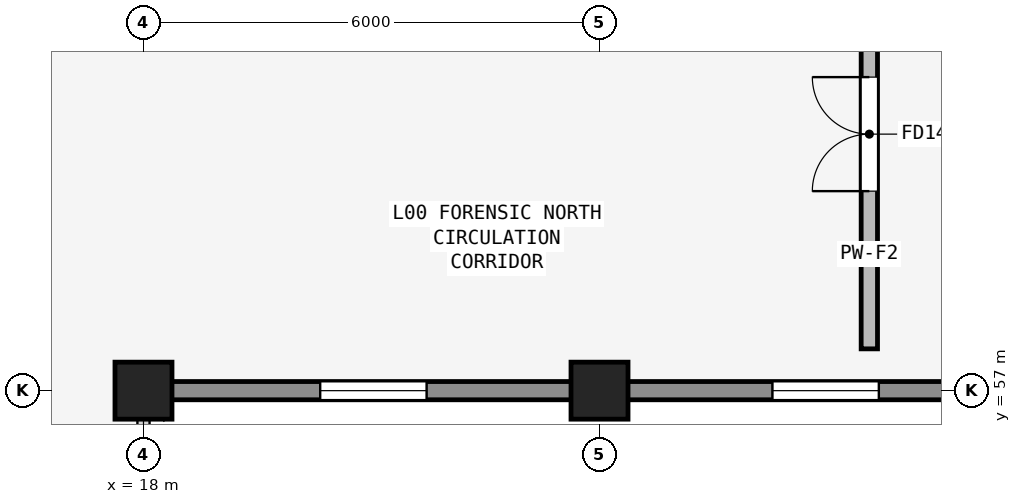
"""IFC4 building model, lengths in metres.
Left out: names, types, materials, properties, quantities, classifications, styles, units other than length and angle.
Written with IfcOpenShell. Run it as: python <this file> out.ifc"""

import sys

from ifc_helpers import new_model, si_unit, direction, frame, frame_2d, origin, origin_2d, place, context, subcontext, project, spatial, rectangle, extrude, element, fill, save


model = new_model("IFC4")
c1 = context("Model", 3, precision=1e-05, world=origin(), true_north=direction((0.0, 1.0)))
c2 = subcontext(c1, "Body", "Model", "MODEL_VIEW")
j1 = project(units=[si_unit("LENGTHUNIT", "METRE"), si_unit("PLANEANGLEUNIT", "RADIAN")], contexts=[c1])
p1 = place(None, origin())
s1 = spatial("IfcSite", under=j1, at=p1, CompositionType="ELEMENT")
p2 = place(p1, origin())
s2 = spatial("IfcBuilding", under=s1, at=p2, CompositionType="ELEMENT")
p3 = place(p2, origin())
s3 = spatial("IfcBuildingStorey", under=s2, at=p3, CompositionType="ELEMENT", Elevation=0.0)
for number, where, z_axis, x_axis in (
    (1, (18.0, 57.0, 0.0), (0.0, 0.0, 1.0), (1.0, 0.0, 0.0)),
    (2, (24.0, 57.0, 0.0), (0.0, 0.0, 1.0), (1.0, 0.0, 0.0)),
):
    element("IfcColumn", number, at=place(p3, frame(where, z_axis=z_axis, x_axis=x_axis)), inside=s3, PredefinedType="COLUMN", context=c2, shape_type="SweptSolid", body=[
        extrude(rectangle(XDim=0.75, YDim=0.75, at=origin_2d()), origin(), (0.0, 0.0, 1.0), 4.8),
    ])
p4 = place(p3, frame((18.05, 57.0, 0.0), z_axis=(0.0, 0.0, 1.0), x_axis=(1.0, 0.0, 0.0)))
e3 = element("IfcWall", 3, at=p4, inside=s3, PredefinedType="SOLIDWALL", context=c2, shape_type="SweptSolid", body=[
    extrude(rectangle(XDim=5.95, YDim=0.24, at=frame_2d((2.975, 0.0))), origin(), (0.0, 0.0, 1.0), 3.94),
])
p5 = place(p4, frame((2.275, 0.0, 0.85)))
e4 = element("IfcOpeningElement", 4, at=p5, cuts=e3, PredefinedType="OPENING", context=c2, shape_type="SweptSolid", body=[
    extrude(rectangle(XDim=1.4, YDim=1.8, at=frame_2d((0.7, 0.9))), frame((0.0, 0.13, 0.0), z_axis=(0.0, -1.0, 0.0), x_axis=(1.0, 0.0, 0.0)), (0.0, 0.0, 1.0), 0.26),
])
p6 = place(p3, frame((24.0, 57.0, 0.0), z_axis=(0.0, 0.0, 1.0), x_axis=(1.0, 0.0, 0.0)))
e5 = element("IfcWall", 5, at=p6, inside=s3, PredefinedType="SOLIDWALL", context=c2, shape_type="SweptSolid", body=[
    extrude(rectangle(XDim=5.95, YDim=0.24, at=frame_2d((2.975, 0.0))), origin(), (0.0, 0.0, 1.0), 3.89),
])
p7 = place(p6, frame((2.275, 0.0, 0.85)))
e6 = element("IfcOpeningElement", 6, at=p7, cuts=e5, PredefinedType="OPENING", context=c2, shape_type="SweptSolid", body=[
    extrude(rectangle(XDim=1.4, YDim=1.8, at=frame_2d((0.7, 0.9))), frame((0.0, 0.13, 0.0), z_axis=(0.0, -1.0, 0.0), x_axis=(1.0, 0.0, 0.0)), (0.0, 0.0, 1.0), 0.26),
])
p8 = place(p3, frame((27.55, 57.55, 0.0), z_axis=(0.0, 0.0, 1.0), x_axis=(0.0, 1.0, 0.0)))
e7 = element("IfcWall", 7, at=p8, inside=s3, PredefinedType="PARTITIONING", context=c2, shape_type="SweptSolid", body=[
    extrude(rectangle(XDim=5.65, YDim=0.215, at=frame_2d((2.825, 0.0))), origin(), (0.0, 0.0, 1.0), 4.09),
])
p9 = place(p8, frame((2.075, 0.0, 0.0)))
e8 = element("IfcOpeningElement", 8, at=p9, cuts=e7, PredefinedType="OPENING", context=c2, shape_type="SweptSolid", body=[
    extrude(rectangle(XDim=1.5, YDim=2.15, at=frame_2d((0.75, 1.075))), frame((0.0, 0.117, 0.0), z_axis=(0.0, -1.0, 0.0), x_axis=(1.0, 0.0, 0.0)), (0.0, 0.0, 1.0), 0.235),
])
p10 = place(p5, origin())
e9 = element("IfcWindow", 9, at=p10, inside=s3, PartitioningType="SINGLE_PANEL", PredefinedType="WINDOW", context=c2, shape_type="SweptSolid", body=[
    extrude(rectangle(XDim=1.4, YDim=1.8, at=frame_2d((0.7, 0.9))), frame((0.0, 0.03, 0.0), z_axis=(0.0, -1.0, 0.0), x_axis=(1.0, 0.0, 0.0)), (0.0, 0.0, 1.0), 0.06),
])
fill(e4, e9)
p11 = place(p7, origin())
e10 = element("IfcWindow", 10, at=p11, inside=s3, PartitioningType="SINGLE_PANEL", PredefinedType="WINDOW", context=c2, shape_type="SweptSolid", body=[
    extrude(rectangle(XDim=1.4, YDim=1.8, at=frame_2d((0.7, 0.9))), frame((0.0, 0.03, 0.0), z_axis=(0.0, -1.0, 0.0), x_axis=(1.0, 0.0, 0.0)), (0.0, 0.0, 1.0), 0.06),
])
fill(e6, e10)
p12 = place(p9, origin())
e11 = element("IfcDoor", 11, at=p12, inside=s3, OperationType="DOUBLE_DOOR_SINGLE_SWING", PredefinedType="DOOR", context=c2, shape_type="SweptSolid", body=[
    extrude(rectangle(XDim=1.5, YDim=2.15, at=frame_2d((0.75, 1.075))), frame((0.0, 0.025, 0.0), z_axis=(0.0, -1.0, 0.0), x_axis=(1.0, 0.0, 0.0)), (0.0, 0.0, 1.0), 0.05),
])
fill(e8, e11)
save(model, sys.argv[1])
